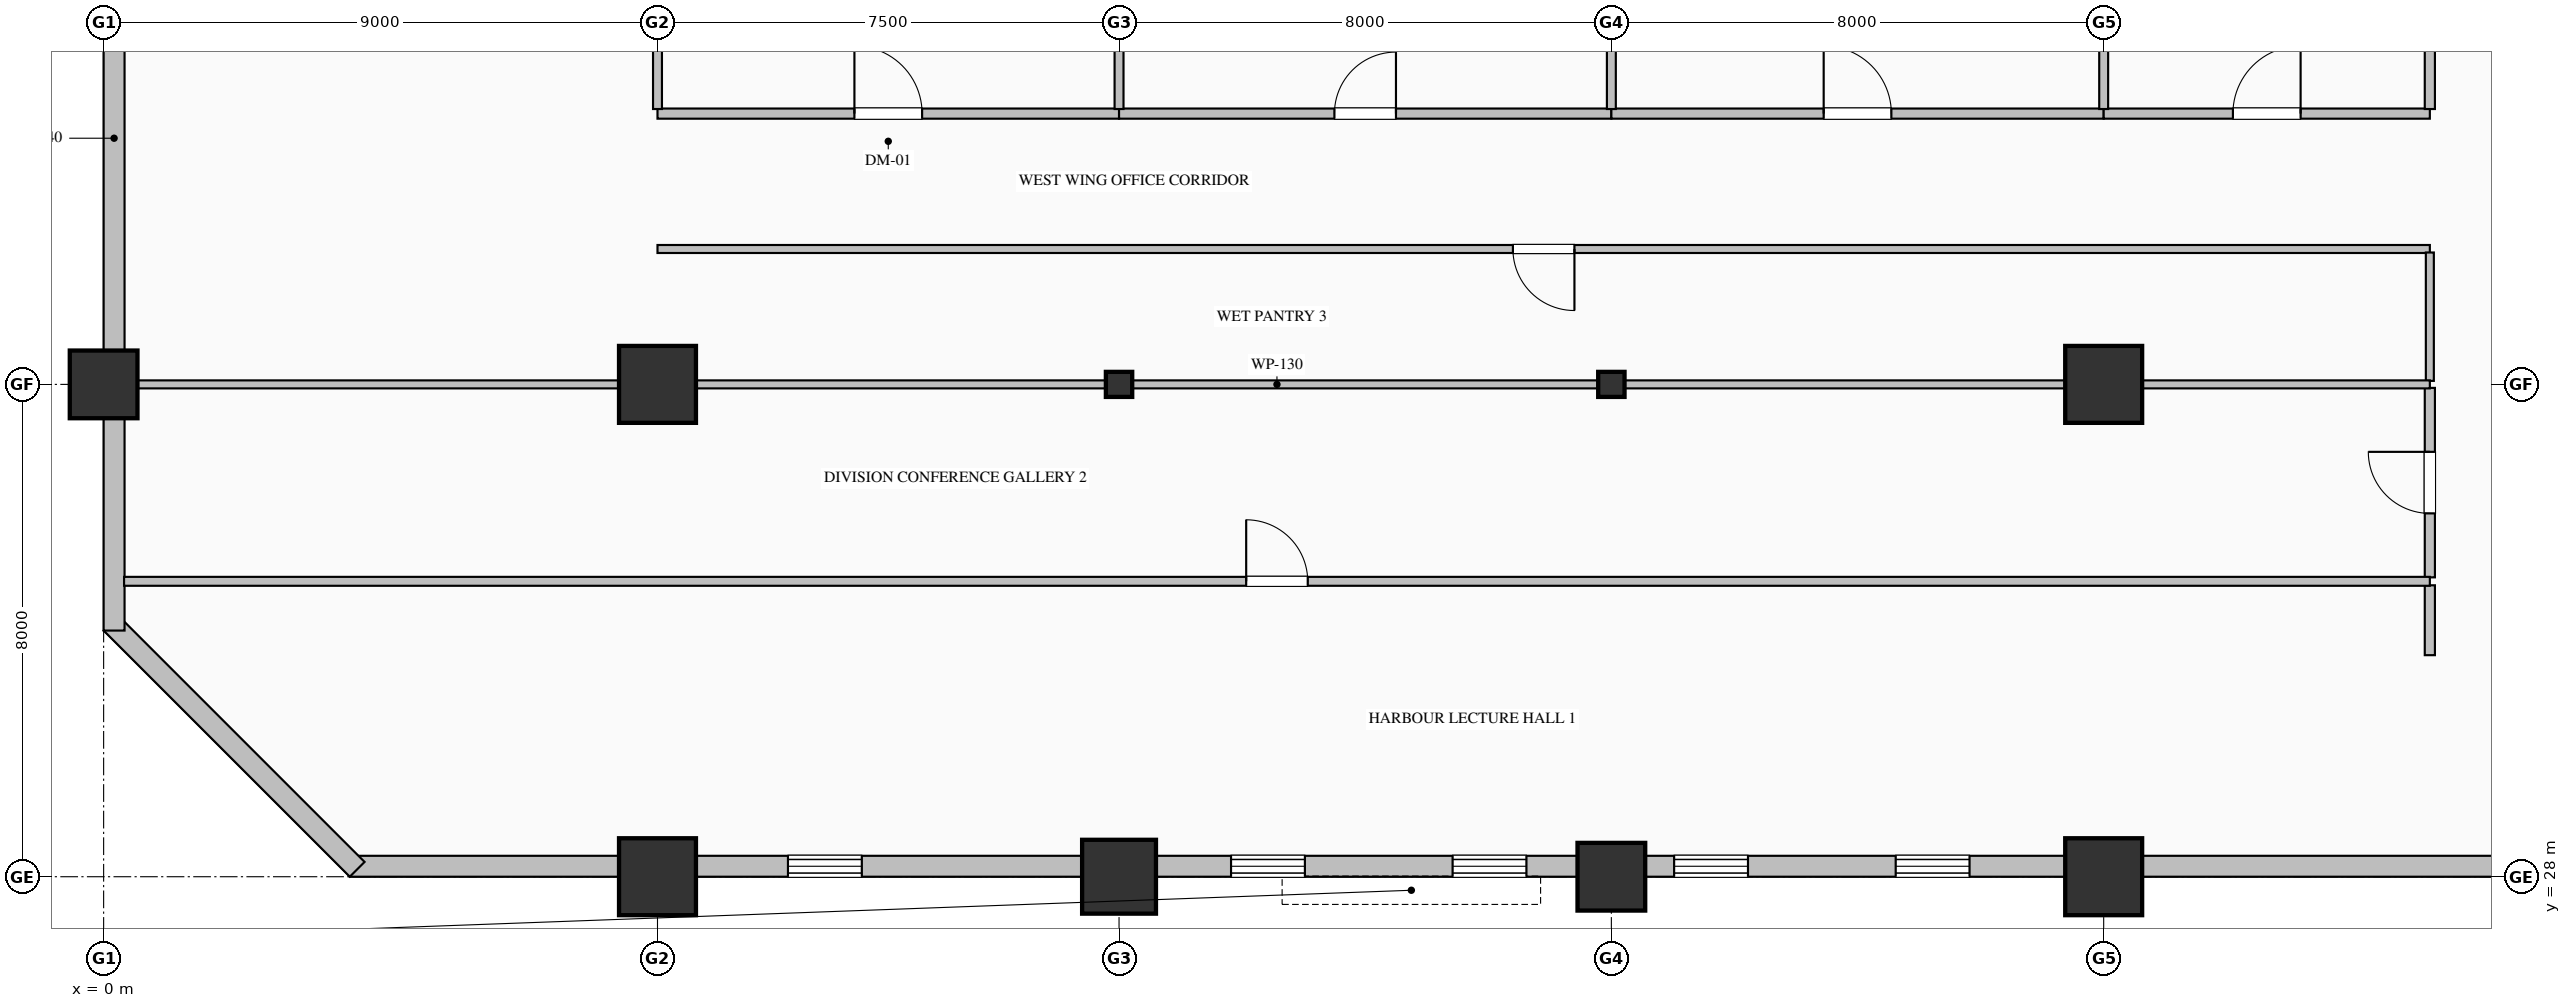
"""IFC4 building model, lengths in metres.
Left out: names, types, materials, properties, quantities, classifications, styles, units other than length and angle.
Written with IfcOpenShell. Run it as: python <this file> out.ifc"""

import sys

from ifc_helpers import new_model, si_unit, direction, frame, frame_2d, origin, origin_2d, place, context, subcontext, project, spatial, rectangle, hollow_rectangle, hollow_circle, i_section, extrude, element, fill, save


model = new_model("IFC4")
c1 = context("Model", 3, precision=1e-05, world=origin(), true_north=direction((0.0, 1.0)))
c2 = subcontext(c1, "Body", "Model", "MODEL_VIEW")
j1 = project(units=[si_unit("LENGTHUNIT", "METRE"), si_unit("PLANEANGLEUNIT", "RADIAN")], contexts=[c1])
p1 = place(None, origin())
s1 = spatial("IfcSite", under=j1, at=p1, CompositionType="ELEMENT")
p2 = place(p1, origin())
s2 = spatial("IfcBuilding", under=s1, at=p2, CompositionType="ELEMENT")
p3 = place(p2, frame((0.0, 0.0, 44.2)))
s3 = spatial("IfcBuildingStorey", under=s2, at=p3, CompositionType="ELEMENT", Elevation=44.2)
p4 = place(p3, frame((0.0, 36.0, 0.0), z_axis=(0.0, 0.0, 1.0), x_axis=(1.0, 0.0, 0.0)))
e1 = element("IfcColumn", 1, at=p4, inside=s3, PredefinedType="COLUMN", context=c2, shape_type="SweptSolid", body=[
    extrude(hollow_rectangle(XDim=1.1, YDim=1.1, WallThickness=0.04, at=origin_2d()), origin(), (0.0, 0.0, 1.0), 4.0),
])
for number, where, z_axis, x_axis in (
    (2, (9.0, 28.0, 0.0), (0.0, 0.0, 1.0), (1.0, 0.0, 0.0)),
    (3, (9.0, 36.0, 0.0), (0.0, 0.0, 1.0), (1.0, 0.0, 0.0)),
):
    element("IfcColumn", number, at=place(p3, frame(where, z_axis=z_axis, x_axis=x_axis)), inside=s3, PredefinedType="COLUMN", context=c2, shape_type="SweptSolid", body=[
        extrude(hollow_rectangle(XDim=1.25, YDim=1.25, WallThickness=0.045, at=origin_2d()), origin(), (0.0, 0.0, 1.0), 4.0),
    ])
p5 = place(p3, frame((16.5, 28.0, 0.0), z_axis=(0.0, 0.0, 1.0), x_axis=(1.0, 0.0, 0.0)))
e4 = element("IfcColumn", 4, at=p5, inside=s3, PredefinedType="COLUMN", context=c2, shape_type="SweptSolid", body=[
    extrude(hollow_circle(Radius=0.6, WallThickness=0.04, at=origin_2d()), origin(), (0.0, 0.0, 1.0), 4.0),
])
p6 = place(p3, frame((16.5, 36.0, 0.0), z_axis=(0.0, 0.0, 1.0), x_axis=(1.0, 0.0, 0.0)))
e5 = element("IfcColumn", 5, at=p6, inside=s3, PredefinedType="COLUMN", context=c2, shape_type="SweptSolid", body=[
    extrude(i_section(OverallWidth=0.407, OverallDepth=0.428, WebThickness=0.02, FlangeThickness=0.035, FilletRadius=0.022, at=origin_2d()), origin(), (0.0, 0.0, 1.0), 4.0),
])
p7 = place(p3, frame((24.5, 28.0, 0.0), z_axis=(0.0, 0.0, 1.0), x_axis=(1.0, 0.0, 0.0)))
e6 = element("IfcColumn", 6, at=p7, inside=s3, PredefinedType="COLUMN", context=c2, shape_type="SweptSolid", body=[
    extrude(hollow_rectangle(XDim=1.1, YDim=1.1, WallThickness=0.04, at=origin_2d()), origin(), (0.0, 0.0, 1.0), 4.0),
])
p8 = place(p3, frame((24.5, 36.0, 0.0), z_axis=(0.0, 0.0, 1.0), x_axis=(1.0, 0.0, 0.0)))
e7 = element("IfcColumn", 7, at=p8, inside=s3, PredefinedType="COLUMN", context=c2, shape_type="SweptSolid", body=[
    extrude(i_section(OverallWidth=0.407, OverallDepth=0.428, WebThickness=0.02, FlangeThickness=0.035, FilletRadius=0.022, at=origin_2d()), origin(), (0.0, 0.0, 1.0), 4.0),
])
for number, where, z_axis, x_axis in (
    (8, (32.5, 28.0, 0.0), (0.0, 0.0, 1.0), (1.0, 0.0, 0.0)),
    (9, (32.5, 36.0, 0.0), (0.0, 0.0, 1.0), (1.0, 0.0, 0.0)),
):
    element("IfcColumn", number, at=place(p3, frame(where, z_axis=z_axis, x_axis=x_axis)), inside=s3, PredefinedType="COLUMN", context=c2, shape_type="SweptSolid", body=[
        extrude(hollow_rectangle(XDim=1.25, YDim=1.25, WallThickness=0.045, at=origin_2d()), origin(), (0.0, 0.0, 1.0), 4.0),
    ])
p9 = place(p3, frame((40.52, 28.17, 0.0), z_axis=(0.0, 0.0, 1.0), x_axis=(-1.0, 0.0, 0.0)))
e10 = element("IfcWall", 10, at=p9, inside=s3, PredefinedType="SOLIDWALL", context=c2, shape_type="SweptSolid", body=[
    extrude(rectangle(XDim=36.52, YDim=0.34, at=frame_2d((18.26, 0.0))), origin(), (0.0, 0.0, 1.0), 3.05),
])
p10 = place(p9, frame((10.2, 0.0, 0.7)))
e11 = element("IfcOpeningElement", 11, at=p10, cuts=e10, PredefinedType="OPENING", context=c2, shape_type="SweptSolid", body=[
    extrude(rectangle(XDim=1.2, YDim=1.85, at=frame_2d((0.6, 0.925))), frame((0.0, 0.18, 0.0), z_axis=(0.0, -1.0, 0.0), x_axis=(1.0, 0.0, 0.0)), (0.0, 0.0, 1.0), 0.36),
])
p11 = place(p9, frame((13.8, 0.0, 0.7)))
e12 = element("IfcOpeningElement", 12, at=p11, cuts=e10, PredefinedType="OPENING", context=c2, shape_type="SweptSolid", body=[
    extrude(rectangle(XDim=1.2, YDim=1.85, at=frame_2d((0.6, 0.925))), frame((0.0, 0.18, 0.0), z_axis=(0.0, -1.0, 0.0), x_axis=(1.0, 0.0, 0.0)), (0.0, 0.0, 1.0), 0.36),
])
p12 = place(p9, frame((17.4, 0.0, 0.7)))
e13 = element("IfcOpeningElement", 13, at=p12, cuts=e10, PredefinedType="OPENING", context=c2, shape_type="SweptSolid", body=[
    extrude(rectangle(XDim=1.2, YDim=1.85, at=frame_2d((0.6, 0.925))), frame((0.0, 0.18, 0.0), z_axis=(0.0, -1.0, 0.0), x_axis=(1.0, 0.0, 0.0)), (0.0, 0.0, 1.0), 0.36),
])
p13 = place(p9, frame((21.0, 0.0, 0.7)))
e14 = element("IfcOpeningElement", 14, at=p13, cuts=e10, PredefinedType="OPENING", context=c2, shape_type="SweptSolid", body=[
    extrude(rectangle(XDim=1.2, YDim=1.85, at=frame_2d((0.6, 0.925))), frame((0.0, 0.18, 0.0), z_axis=(0.0, -1.0, 0.0), x_axis=(1.0, 0.0, 0.0)), (0.0, 0.0, 1.0), 0.36),
])
p14 = place(p9, frame((28.2, 0.0, 0.7)))
e15 = element("IfcOpeningElement", 15, at=p14, cuts=e10, PredefinedType="OPENING", context=c2, shape_type="SweptSolid", body=[
    extrude(rectangle(XDim=1.2, YDim=1.85, at=frame_2d((0.6, 0.925))), frame((0.0, 0.18, 0.0), z_axis=(0.0, -1.0, 0.0), x_axis=(1.0, 0.0, 0.0)), (0.0, 0.0, 1.0), 0.36),
])
p15 = place(p3, frame((4.12, 28.12, 0.0), z_axis=(0.0, 0.0, 1.0), x_axis=(-0.707106781187, 0.707106781187, 0.0)))
e16 = element("IfcWall", 16, at=p15, inside=s3, PredefinedType="SOLIDWALL", context=c2, shape_type="SweptSolid", body=[
    extrude(rectangle(XDim=5.657, YDim=0.34, at=frame_2d((2.828, 0.0))), origin(), (0.0, 0.0, 1.0), 3.75),
])
p16 = place(p3, frame((0.17, 32.0, 0.0), z_axis=(0.0, 0.0, 1.0), x_axis=(0.0, 1.0, 0.0)))
e17 = element("IfcWall", 17, at=p16, inside=s3, PredefinedType="SOLIDWALL", context=c2, shape_type="SweptSolid", body=[
    extrude(rectangle(XDim=16.0, YDim=0.34, at=frame_2d((8.0, 0.0))), origin(), (0.0, 0.0, 1.0), 3.25),
])
p17 = place(p3, frame((9.0, 40.4, 0.0), z_axis=(0.0, 0.0, 1.0), x_axis=(1.0, 0.0, 0.0)))
e18 = element("IfcWall", 18, at=p17, inside=s3, PredefinedType="PARTITIONING", context=c2, shape_type="SweptSolid", body=[
    extrude(rectangle(XDim=7.5, YDim=0.165, at=frame_2d((3.75, 0.0))), origin(), (0.0, 0.0, 1.0), 3.75),
])
p18 = place(p17, frame((3.2, 0.0, 0.0)))
e19 = element("IfcOpeningElement", 19, at=p18, cuts=e18, PredefinedType="OPENING", context=c2, shape_type="SweptSolid", body=[
    extrude(rectangle(XDim=1.1, YDim=2.2, at=frame_2d((0.55, 1.1))), frame((0.0, 0.093, 0.0), z_axis=(0.0, -1.0, 0.0), x_axis=(1.0, 0.0, 0.0)), (0.0, 0.0, 1.0), 0.185),
])
p19 = place(p3, frame((16.5, 40.4, 0.0), z_axis=(0.0, 0.0, 1.0), x_axis=(1.0, 0.0, 0.0)))
e20 = element("IfcWall", 20, at=p19, inside=s3, PredefinedType="PARTITIONING", context=c2, shape_type="SweptSolid", body=[
    extrude(rectangle(XDim=8.0, YDim=0.165, at=frame_2d((4.0, 0.0))), origin(), (0.0, 0.0, 1.0), 3.75),
])
p20 = place(p19, frame((3.5, 0.0, 0.0)))
e21 = element("IfcOpeningElement", 21, at=p20, cuts=e20, PredefinedType="OPENING", context=c2, shape_type="SweptSolid", body=[
    extrude(rectangle(XDim=1.0, YDim=2.15, at=frame_2d((0.5, 1.075))), frame((0.0, 0.093, 0.0), z_axis=(0.0, -1.0, 0.0), x_axis=(1.0, 0.0, 0.0)), (0.0, 0.0, 1.0), 0.185),
])
p21 = place(p3, frame((24.5, 40.4, 0.0), z_axis=(0.0, 0.0, 1.0), x_axis=(1.0, 0.0, 0.0)))
e22 = element("IfcWall", 22, at=p21, inside=s3, PredefinedType="PARTITIONING", context=c2, shape_type="SweptSolid", body=[
    extrude(rectangle(XDim=8.0, YDim=0.165, at=frame_2d((4.0, 0.0))), origin(), (0.0, 0.0, 1.0), 3.75),
])
p22 = place(p21, frame((3.45, 0.0, 0.0)))
e23 = element("IfcOpeningElement", 23, at=p22, cuts=e22, PredefinedType="OPENING", context=c2, shape_type="SweptSolid", body=[
    extrude(rectangle(XDim=1.1, YDim=2.2, at=frame_2d((0.55, 1.1))), frame((0.0, 0.093, 0.0), z_axis=(0.0, -1.0, 0.0), x_axis=(1.0, 0.0, 0.0)), (0.0, 0.0, 1.0), 0.185),
])
p23 = place(p3, frame((32.5, 40.4, 0.0), z_axis=(0.0, 0.0, 1.0), x_axis=(1.0, 0.0, 0.0)))
e24 = element("IfcWall", 24, at=p23, inside=s3, PredefinedType="PARTITIONING", context=c2, shape_type="SweptSolid", body=[
    extrude(rectangle(XDim=5.3, YDim=0.165, at=frame_2d((2.65, 0.0))), origin(), (0.0, 0.0, 1.0), 3.75),
])
p24 = place(p23, frame((2.1, 0.0, 0.0)))
e25 = element("IfcOpeningElement", 25, at=p24, cuts=e24, PredefinedType="OPENING", context=c2, shape_type="SweptSolid", body=[
    extrude(rectangle(XDim=1.1, YDim=2.2, at=frame_2d((0.55, 1.1))), frame((0.0, 0.093, 0.0), z_axis=(0.0, -1.0, 0.0), x_axis=(1.0, 0.0, 0.0)), (0.0, 0.0, 1.0), 0.185),
])
p25 = place(p3, frame((37.8, 38.2, 0.0), z_axis=(0.0, 0.0, 1.0), x_axis=(-1.0, 0.0, 0.0)))
e26 = element("IfcWall", 26, at=p25, inside=s3, PredefinedType="PARTITIONING", context=c2, shape_type="SweptSolid", body=[
    extrude(rectangle(XDim=28.8, YDim=0.13, at=frame_2d((14.4, 0.0))), origin(), (0.0, 0.0, 1.0), 3.75),
])
p26 = place(p25, frame((13.9, 0.0, 0.0)))
e27 = element("IfcOpeningElement", 27, at=p26, cuts=e26, PredefinedType="OPENING", context=c2, shape_type="SweptSolid", body=[
    extrude(rectangle(XDim=1.0, YDim=2.15, at=frame_2d((0.5, 1.075))), frame((0.0, 0.075, 0.0), z_axis=(0.0, -1.0, 0.0), x_axis=(1.0, 0.0, 0.0)), (0.0, 0.0, 1.0), 0.15),
])
p27 = place(p3, frame((37.8, 40.475, 0.0), z_axis=(0.0, 0.0, 1.0), x_axis=(0.0, 1.0, 0.0)))
e28 = element("IfcWall", 28, at=p27, inside=s3, PredefinedType="PARTITIONING", context=c2, shape_type="SweptSolid", body=[
    extrude(rectangle(XDim=3.651, YDim=0.165, at=frame_2d((1.825, 0.0))), origin(), (0.0, 0.0, 1.0), 3.75),
])
p28 = place(p3, frame((37.8, 31.6, 0.0), z_axis=(0.0, 0.0, 1.0), x_axis=(0.0, 1.0, 0.0)))
e29 = element("IfcWall", 29, at=p28, inside=s3, PredefinedType="PARTITIONING", context=c2, shape_type="SweptSolid", body=[
    extrude(rectangle(XDim=1.135, YDim=0.165, at=frame_2d((0.568, 0.0))), origin(), (0.0, 0.0, 1.0), 3.75),
])
p29 = place(p3, frame((37.8, 32.865, 0.0), z_axis=(0.0, 0.0, 1.0), x_axis=(0.0, 1.0, 0.0)))
e30 = element("IfcWall", 30, at=p29, inside=s3, PredefinedType="PARTITIONING", context=c2, shape_type="SweptSolid", body=[
    extrude(rectangle(XDim=3.079, YDim=0.165, at=frame_2d((1.539, 0.0))), origin(), (0.0, 0.0, 1.0), 3.75),
])
p30 = place(p29, frame((1.039, 0.0, 0.0)))
e31 = element("IfcOpeningElement", 31, at=p30, cuts=e30, PredefinedType="OPENING", context=c2, shape_type="SweptSolid", body=[
    extrude(rectangle(XDim=1.0, YDim=2.15, at=frame_2d((0.5, 1.075))), frame((0.0, 0.093, 0.0), z_axis=(0.0, -1.0, 0.0), x_axis=(1.0, 0.0, 0.0)), (0.0, 0.0, 1.0), 0.185),
])
p31 = place(p3, frame((37.8, 36.057, 0.0), z_axis=(0.0, 0.0, 1.0), x_axis=(0.0, 1.0, 0.0)))
e32 = element("IfcWall", 32, at=p31, inside=s3, PredefinedType="PARTITIONING", context=c2, shape_type="SweptSolid", body=[
    extrude(rectangle(XDim=2.086, YDim=0.13, at=frame_2d((1.043, 0.0))), origin(), (0.0, 0.0, 1.0), 3.75),
])
p32 = place(p3, frame((9.0, 51.668, 0.0), z_axis=(0.0, 0.0, 1.0), x_axis=(0.0, -1.0, 0.0)))
e33 = element("IfcWall", 33, at=p32, inside=s3, PredefinedType="PARTITIONING", context=c2, shape_type="SweptSolid", body=[
    extrude(rectangle(XDim=11.193, YDim=0.145, at=frame_2d((5.597, 0.0))), origin(), (0.0, 0.0, 1.0), 3.042),
])
p33 = place(p32, frame((5.047, 0.0, 0.0)))
e34 = element("IfcOpeningElement", 34, at=p33, cuts=e33, PredefinedType="OPENING", context=c2, shape_type="SweptSolid", body=[
    extrude(rectangle(XDim=1.1, YDim=2.2, at=frame_2d((0.55, 1.1))), frame((0.0, 0.083, 0.0), z_axis=(0.0, -1.0, 0.0), x_axis=(1.0, 0.0, 0.0)), (0.0, 0.0, 1.0), 0.165),
])
for number, where, z_axis, x_axis in (
    (35, (16.5, 51.668, 0.0), (0.0, 0.0, 1.0), (0.0, -1.0, 0.0)),
    (36, (24.5, 51.668, 0.0), (0.0, 0.0, 1.0), (0.0, -1.0, 0.0)),
):
    element("IfcWall", number, at=place(p3, frame(where, z_axis=z_axis, x_axis=x_axis)), inside=s3, PredefinedType="PARTITIONING", context=c2, shape_type="SweptSolid", body=[
        extrude(rectangle(XDim=11.193, YDim=0.145, at=frame_2d((5.597, 0.0))), origin(), (0.0, 0.0, 1.0), 3.042),
    ])
p34 = place(p3, frame((32.5, 51.668, 0.0), z_axis=(0.0, 0.0, 1.0), x_axis=(0.0, -1.0, 0.0)))
e37 = element("IfcWall", 37, at=p34, inside=s3, PredefinedType="PARTITIONING", context=c2, shape_type="SweptSolid", body=[
    extrude(rectangle(XDim=11.193, YDim=0.145, at=frame_2d((5.597, 0.0))), origin(), (0.0, 0.0, 1.0), 3.75),
])
p35 = place(p3, frame((0.332, 32.8, 0.0), z_axis=(0.0, 0.0, 1.0), x_axis=(1.0, 0.0, 0.0)))
e38 = element("IfcWall", 38, at=p35, inside=s3, PredefinedType="PARTITIONING", context=c2, shape_type="SweptSolid", body=[
    extrude(rectangle(XDim=37.468, YDim=0.145, at=frame_2d((18.734, 0.0))), origin(), (0.0, 0.0, 1.0), 3.75),
])
p36 = place(p35, frame((18.234, 0.0, 0.0)))
e39 = element("IfcOpeningElement", 39, at=p36, cuts=e38, PredefinedType="OPENING", context=c2, shape_type="SweptSolid", body=[
    extrude(rectangle(XDim=1.0, YDim=2.15, at=frame_2d((0.5, 1.075))), frame((0.0, 0.083, 0.0), z_axis=(0.0, -1.0, 0.0), x_axis=(1.0, 0.0, 0.0)), (0.0, 0.0, 1.0), 0.165),
])
p37 = place(p3, frame((0.332, 36.0, 0.0), z_axis=(0.0, 0.0, 1.0), x_axis=(1.0, 0.0, 0.0)))
e40 = element("IfcWall", 40, at=p37, inside=s3, PredefinedType="PARTITIONING", context=c2, shape_type="SweptSolid", body=[
    extrude(rectangle(XDim=37.468, YDim=0.13, at=frame_2d((18.734, 0.0))), origin(), (0.0, 0.0, 1.0), 3.042),
])
p38 = place(p10, origin())
e41 = element("IfcWindow", 41, at=p38, inside=s3, PartitioningType="DOUBLE_PANEL_VERTICAL", PredefinedType="WINDOW", context=c2, shape_type="SweptSolid", body=[
    extrude(rectangle(XDim=1.2, YDim=1.85, at=frame_2d((0.6, 0.925))), frame((0.0, 0.15, 0.0), z_axis=(0.0, -1.0, 0.0), x_axis=(1.0, 0.0, 0.0)), (0.0, 0.0, 1.0), 0.06),
])
fill(e11, e41)
p39 = place(p11, origin())
e42 = element("IfcWindow", 42, at=p39, inside=s3, PartitioningType="DOUBLE_PANEL_VERTICAL", PredefinedType="WINDOW", context=c2, shape_type="SweptSolid", body=[
    extrude(rectangle(XDim=1.2, YDim=1.85, at=frame_2d((0.6, 0.925))), frame((0.0, 0.15, 0.0), z_axis=(0.0, -1.0, 0.0), x_axis=(1.0, 0.0, 0.0)), (0.0, 0.0, 1.0), 0.06),
])
fill(e12, e42)
p40 = place(p12, origin())
e43 = element("IfcWindow", 43, at=p40, inside=s3, PartitioningType="DOUBLE_PANEL_VERTICAL", PredefinedType="WINDOW", context=c2, shape_type="SweptSolid", body=[
    extrude(rectangle(XDim=1.2, YDim=1.85, at=frame_2d((0.6, 0.925))), frame((0.0, 0.15, 0.0), z_axis=(0.0, -1.0, 0.0), x_axis=(1.0, 0.0, 0.0)), (0.0, 0.0, 1.0), 0.06),
])
fill(e13, e43)
p41 = place(p13, origin())
e44 = element("IfcWindow", 44, at=p41, inside=s3, PartitioningType="DOUBLE_PANEL_VERTICAL", PredefinedType="WINDOW", context=c2, shape_type="SweptSolid", body=[
    extrude(rectangle(XDim=1.2, YDim=1.85, at=frame_2d((0.6, 0.925))), frame((0.0, 0.15, 0.0), z_axis=(0.0, -1.0, 0.0), x_axis=(1.0, 0.0, 0.0)), (0.0, 0.0, 1.0), 0.06),
])
fill(e14, e44)
p42 = place(p14, origin())
e45 = element("IfcWindow", 45, at=p42, inside=s3, PartitioningType="DOUBLE_PANEL_VERTICAL", PredefinedType="WINDOW", context=c2, shape_type="SweptSolid", body=[
    extrude(rectangle(XDim=1.2, YDim=1.85, at=frame_2d((0.6, 0.925))), frame((0.0, 0.15, 0.0), z_axis=(0.0, -1.0, 0.0), x_axis=(1.0, 0.0, 0.0)), (0.0, 0.0, 1.0), 0.06),
])
fill(e15, e45)
p43 = place(p18, origin())
e46 = element("IfcDoor", 46, at=p43, inside=s3, OperationType="SINGLE_SWING_LEFT", PredefinedType="DOOR", context=c2, shape_type="SweptSolid", body=[
    extrude(rectangle(XDim=1.1, YDim=2.2, at=frame_2d((0.55, 1.1))), frame((0.0, 0.025, 0.0), z_axis=(0.0, -1.0, 0.0), x_axis=(1.0, 0.0, 0.0)), (0.0, 0.0, 1.0), 0.05),
])
fill(e19, e46)
p44 = place(p20, origin())
e47 = element("IfcDoor", 47, at=p44, inside=s3, OperationType="SINGLE_SWING_RIGHT", PredefinedType="DOOR", context=c2, shape_type="SweptSolid", body=[
    extrude(rectangle(XDim=1.0, YDim=2.15, at=frame_2d((0.5, 1.075))), frame((0.0, 0.025, 0.0), z_axis=(0.0, -1.0, 0.0), x_axis=(1.0, 0.0, 0.0)), (0.0, 0.0, 1.0), 0.05),
])
fill(e21, e47)
p45 = place(p22, origin())
e48 = element("IfcDoor", 48, at=p45, inside=s3, OperationType="SINGLE_SWING_LEFT", PredefinedType="DOOR", context=c2, shape_type="SweptSolid", body=[
    extrude(rectangle(XDim=1.1, YDim=2.2, at=frame_2d((0.55, 1.1))), frame((0.0, 0.025, 0.0), z_axis=(0.0, -1.0, 0.0), x_axis=(1.0, 0.0, 0.0)), (0.0, 0.0, 1.0), 0.05),
])
fill(e23, e48)
p46 = place(p24, origin())
e49 = element("IfcDoor", 49, at=p46, inside=s3, OperationType="SINGLE_SWING_RIGHT", PredefinedType="DOOR", context=c2, shape_type="SweptSolid", body=[
    extrude(rectangle(XDim=1.1, YDim=2.2, at=frame_2d((0.55, 1.1))), frame((0.0, 0.025, 0.0), z_axis=(0.0, -1.0, 0.0), x_axis=(1.0, 0.0, 0.0)), (0.0, 0.0, 1.0), 0.05),
])
fill(e25, e49)
p47 = place(p36, origin())
e50 = element("IfcDoor", 50, at=p47, inside=s3, OperationType="SINGLE_SWING_LEFT", PredefinedType="DOOR", context=c2, shape_type="SweptSolid", body=[
    extrude(rectangle(XDim=1.0, YDim=2.15, at=frame_2d((0.5, 1.075))), frame((0.0, 0.025, 0.0), z_axis=(0.0, -1.0, 0.0), x_axis=(1.0, 0.0, 0.0)), (0.0, 0.0, 1.0), 0.05),
])
fill(e39, e50)
p48 = place(p30, origin())
e51 = element("IfcDoor", 51, at=p48, inside=s3, OperationType="SINGLE_SWING_RIGHT", PredefinedType="DOOR", context=c2, shape_type="SweptSolid", body=[
    extrude(rectangle(XDim=1.0, YDim=2.15, at=frame_2d((0.5, 1.075))), frame((0.0, 0.025, 0.0), z_axis=(0.0, -1.0, 0.0), x_axis=(1.0, 0.0, 0.0)), (0.0, 0.0, 1.0), 0.05),
])
fill(e31, e51)
p49 = place(p26, origin())
e52 = element("IfcDoor", 52, at=p49, inside=s3, OperationType="SINGLE_SWING_LEFT", PredefinedType="DOOR", context=c2, shape_type="SweptSolid", body=[
    extrude(rectangle(XDim=1.0, YDim=2.15, at=frame_2d((0.5, 1.075))), frame((0.0, 0.025, 0.0), z_axis=(0.0, -1.0, 0.0), x_axis=(1.0, 0.0, 0.0)), (0.0, 0.0, 1.0), 0.05),
])
fill(e27, e52)
save(model, sys.argv[1])
